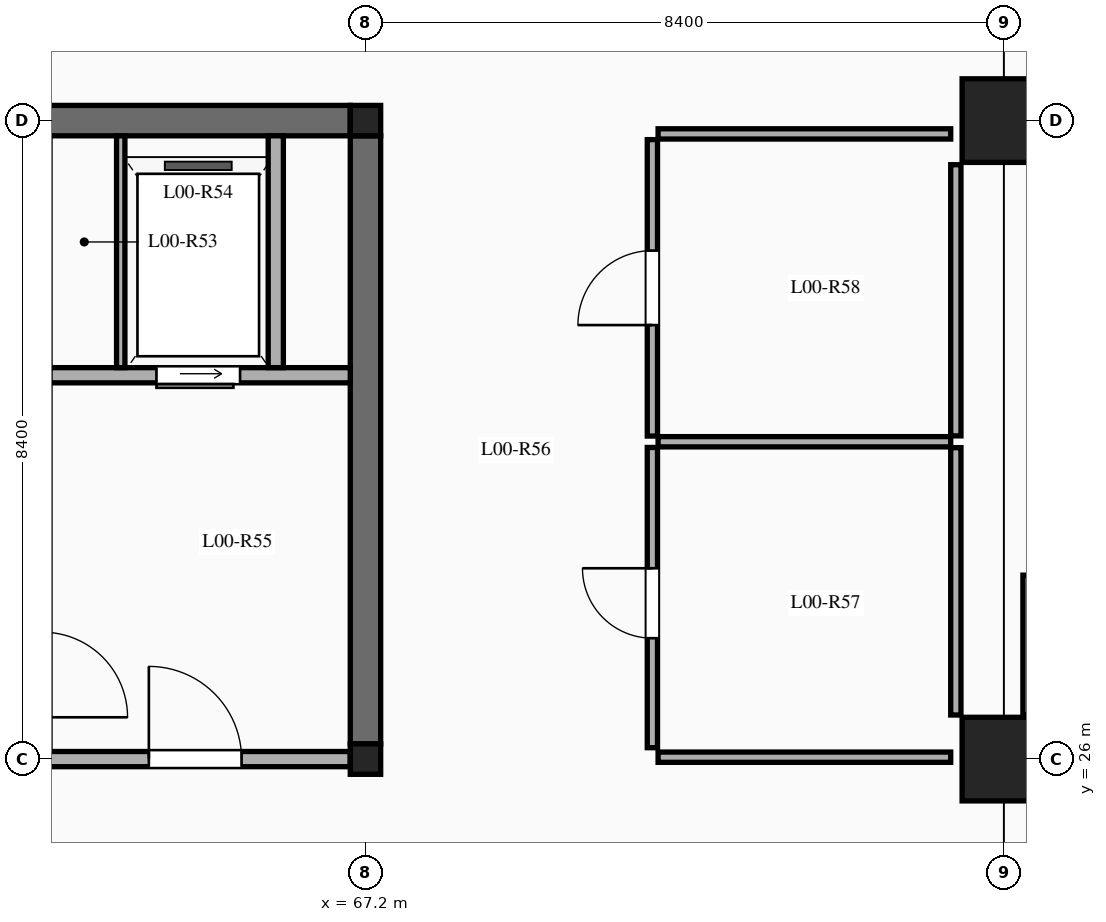
"""IFC4 building model, lengths in metres.
Left out: names, types, materials, properties, quantities, classifications, styles, units other than length and angle.
Written with IfcOpenShell. Run it as: python <this file> out.ifc"""

import sys

from ifc_helpers import new_model, si_unit, direction, frame, frame_2d, origin, origin_2d, place, context, subcontext, project, spatial, rectangle, extrude, element, fill, save


model = new_model("IFC4")
c1 = context("Model", 3, precision=1e-05, world=origin(), true_north=direction((0.0, 1.0)))
c2 = subcontext(c1, "Body", "Model", "MODEL_VIEW")
j1 = project(units=[si_unit("LENGTHUNIT", "METRE"), si_unit("PLANEANGLEUNIT", "RADIAN")], contexts=[c1])
p1 = place(None, origin())
s1 = spatial("IfcSite", under=j1, at=p1, CompositionType="ELEMENT")
p2 = place(p1, origin())
s2 = spatial("IfcBuilding", under=s1, at=p2, CompositionType="ELEMENT")
p3 = place(p2, origin())
s3 = spatial("IfcBuildingStorey", under=s2, at=p3, CompositionType="ELEMENT", Elevation=0.0)
for number, where, z_axis, x_axis in (
    (1, (67.2, 26.0, 0.0), (0.0, 0.0, 1.0), (1.0, 0.0, 0.0)),
    (2, (67.2, 34.4, 0.0), (0.0, 0.0, 1.0), (1.0, 0.0, 0.0)),
):
    element("IfcColumn", number, at=place(p3, frame(where, z_axis=z_axis, x_axis=x_axis)), inside=s3, PredefinedType="COLUMN", context=c2, shape_type="SweptSolid", body=[
        extrude(rectangle(XDim=0.4, YDim=0.4, at=origin_2d()), origin(), (0.0, 0.0, 1.0), 5.4),
    ])
for number, where, z_axis, x_axis in (
    (3, (75.6, 26.0, 0.0), (0.0, 0.0, 1.0), (1.0, 0.0, 0.0)),
    (4, (75.6, 34.4, 0.0), (0.0, 0.0, 1.0), (1.0, 0.0, 0.0)),
):
    element("IfcColumn", number, at=place(p3, frame(where, z_axis=z_axis, x_axis=x_axis)), inside=s3, PredefinedType="COLUMN", context=c2, shape_type="SweptSolid", body=[
        extrude(rectangle(XDim=1.1, YDim=1.1, at=origin_2d()), origin(), (0.0, 0.0, 1.0), 5.4),
    ])
for number, where, z_axis, x_axis in (
    (5, (67.2, 26.2, 0.0), (0.0, 0.0, 1.0), (0.0, 1.0, 0.0)),
    (6, (59.0, 34.4, 0.0), (0.0, 0.0, 1.0), (1.0, 0.0, 0.0)),
):
    element("IfcWall", number, at=place(p3, frame(where, z_axis=z_axis, x_axis=x_axis)), inside=s3, PredefinedType="SHEAR", context=c2, shape_type="SweptSolid", body=[
        extrude(rectangle(XDim=8.0, YDim=0.4, at=frame_2d((4.0, 0.0))), origin(), (0.0, 0.0, 1.0), 5.4),
    ])
p4 = place(p3, frame((59.0, 26.0, 0.0), z_axis=(0.0, 0.0, 1.0), x_axis=(1.0, 0.0, 0.0)))
e7 = element("IfcWall", 7, at=p4, inside=s3, PredefinedType="SOLIDWALL", context=c2, shape_type="SweptSolid", body=[
    extrude(rectangle(XDim=8.0, YDim=0.2, at=frame_2d((4.0, 0.0))), origin(), (0.0, 0.0, 1.0), 4.53),
])
p5 = place(p4, frame((1.55, 0.0, 0.0)))
e8 = element("IfcOpeningElement", 8, at=p5, cuts=e7, PredefinedType="OPENING", context=c2, shape_type="SweptSolid", body=[
    extrude(rectangle(XDim=1.15, YDim=2.15, at=frame_2d((0.575, 1.075))), frame((0.0, 0.11, 0.0), z_axis=(0.0, -1.0, 0.0), x_axis=(1.0, 0.0, 0.0)), (0.0, 0.0, 1.0), 0.22),
])
p6 = place(p4, frame((5.35, 0.0, 0.0)))
e9 = element("IfcOpeningElement", 9, at=p6, cuts=e7, PredefinedType="OPENING", context=c2, shape_type="SweptSolid", body=[
    extrude(rectangle(XDim=1.22, YDim=2.15, at=frame_2d((0.61, 1.075))), frame((0.0, 0.11, 0.0), z_axis=(0.0, -1.0, 0.0), x_axis=(1.0, 0.0, 0.0)), (0.0, 0.0, 1.0), 0.22),
])
p7 = place(p3, frame((63.05, 31.05, 0.0), z_axis=(0.0, 0.0, 1.0), x_axis=(1.0, 0.0, 0.0)))
e10 = element("IfcWall", 10, at=p7, inside=s3, PredefinedType="SOLIDWALL", context=c2, shape_type="SweptSolid", body=[
    extrude(rectangle(XDim=3.95, YDim=0.2, at=frame_2d((1.975, 0.0))), origin(), (0.0, 0.0, 1.0), 5.2),
])
p8 = place(p7, frame((1.4, 0.0, 0.0)))
e11 = element("IfcOpeningElement", 11, at=p8, cuts=e10, PredefinedType="OPENING", context=c2, shape_type="SweptSolid", body=[
    extrude(rectangle(XDim=1.1, YDim=2.15, at=frame_2d((0.55, 1.075))), frame((0.0, 0.11, 0.0), z_axis=(0.0, -1.0, 0.0), x_axis=(1.0, 0.0, 0.0)), (0.0, 0.0, 1.0), 0.22),
])
p9 = place(p3, frame((63.98, 31.15, 0.0), z_axis=(0.0, 0.0, 1.0), x_axis=(0.0, 1.0, 0.0)))
e12 = element("IfcWall", 12, at=p9, inside=s3, PredefinedType="PARTITIONING", context=c2, shape_type="SweptSolid", body=[
    extrude(rectangle(XDim=3.05, YDim=0.11, at=frame_2d((1.525, 0.0))), origin(), (0.0, 0.0, 1.0), 5.2),
])
p10 = place(p3, frame((66.02, 31.15, 0.0), z_axis=(0.0, 0.0, 1.0), x_axis=(0.0, 1.0, 0.0)))
e13 = element("IfcWall", 13, at=p10, inside=s3, PredefinedType="SOLIDWALL", context=c2, shape_type="SweptSolid", body=[
    extrude(rectangle(XDim=3.05, YDim=0.2, at=frame_2d((1.525, 0.0))), origin(), (0.0, 0.0, 1.0), 5.2),
])
p11 = place(p3, frame((75.95, 26.58, 0.0), z_axis=(0.0, 0.0, 1.0), x_axis=(0.0, 1.0, 0.0)))
e14 = element("IfcWall", 14, at=p11, inside=s3, PredefinedType="SOLIDWALL", context=c2, shape_type="SweptSolid", body=[
    extrude(rectangle(XDim=1.84, YDim=0.2, at=frame_2d((0.92, 0.0))), origin(), (0.0, 0.0, 1.0), 4.58),
])
p12 = place(p3, frame((70.975, 26.15, 0.0), z_axis=(0.0, 0.0, 1.0), x_axis=(0.0, 1.0, 0.0)))
e15 = element("IfcWall", 15, at=p12, inside=s3, PredefinedType="PARTITIONING", context=c2, shape_type="SweptSolid", body=[
    extrude(rectangle(XDim=3.95, YDim=0.135, at=frame_2d((1.975, 0.0))), origin(), (0.0, 0.0, 1.0), 4.35),
])
p13 = place(p12, frame((1.441, 0.0, 0.0)))
e16 = element("IfcOpeningElement", 16, at=p13, cuts=e15, PredefinedType="OPENING", context=c2, shape_type="SweptSolid", body=[
    extrude(rectangle(XDim=0.92, YDim=2.12, at=frame_2d((0.46, 1.06))), frame((0.0, 0.077, 0.0), z_axis=(0.0, -1.0, 0.0), x_axis=(1.0, 0.0, 0.0)), (0.0, 0.0, 1.0), 0.155),
])
p14 = place(p3, frame((70.975, 30.25, 0.0), z_axis=(0.0, 0.0, 1.0), x_axis=(0.0, 1.0, 0.0)))
e17 = element("IfcWall", 17, at=p14, inside=s3, PredefinedType="PARTITIONING", context=c2, shape_type="SweptSolid", body=[
    extrude(rectangle(XDim=3.9, YDim=0.135, at=frame_2d((1.95, 0.0))), origin(), (0.0, 0.0, 1.0), 4.35),
])
p15 = place(p14, frame((1.46, 0.0, 0.0)))
e18 = element("IfcOpeningElement", 18, at=p15, cuts=e17, PredefinedType="OPENING", context=c2, shape_type="SweptSolid", body=[
    extrude(rectangle(XDim=0.98, YDim=2.15, at=frame_2d((0.49, 1.075))), frame((0.0, 0.077, 0.0), z_axis=(0.0, -1.0, 0.0), x_axis=(1.0, 0.0, 0.0)), (0.0, 0.0, 1.0), 0.155),
])
for number, where, z_axis, x_axis in (
    (19, (71.05, 30.175, 0.0), (0.0, 0.0, 1.0), (1.0, 0.0, 0.0)),
    (20, (71.05, 26.025, 0.0), (0.0, 0.0, 1.0), (1.0, 0.0, 0.0)),
    (21, (71.05, 34.225, 0.0), (0.0, 0.0, 1.0), (1.0, 0.0, 0.0)),
):
    element("IfcWall", number, at=place(p3, frame(where, z_axis=z_axis, x_axis=x_axis)), inside=s3, PredefinedType="PARTITIONING", context=c2, shape_type="SweptSolid", body=[
        extrude(rectangle(XDim=3.85, YDim=0.135, at=frame_2d((1.925, 0.0))), origin(), (0.0, 0.0, 1.0), 4.35),
    ])
p16 = place(p3, frame((74.968, 26.58, 0.0), z_axis=(0.0, 0.0, 1.0), x_axis=(0.0, 1.0, 0.0)))
e22 = element("IfcWall", 22, at=p16, inside=s3, PredefinedType="PARTITIONING", context=c2, shape_type="SweptSolid", body=[
    extrude(rectangle(XDim=3.517, YDim=0.135, at=frame_2d((1.759, 0.0))), origin(), (0.0, 0.0, 1.0), 4.35),
])
p17 = place(p3, frame((74.968, 30.252, 0.0), z_axis=(0.0, 0.0, 1.0), x_axis=(0.0, 1.0, 0.0)))
e23 = element("IfcWall", 23, at=p17, inside=s3, PredefinedType="PARTITIONING", context=c2, shape_type="SweptSolid", body=[
    extrude(rectangle(XDim=3.568, YDim=0.135, at=frame_2d((1.784, 0.0))), origin(), (0.0, 0.0, 1.0), 4.35),
])
p18 = place(p6, origin())
e24 = element("IfcDoor", 24, at=p18, inside=s3, OperationType="SINGLE_SWING_LEFT", PredefinedType="DOOR", context=c2, shape_type="SweptSolid", body=[
    extrude(rectangle(XDim=1.22, YDim=2.15, at=frame_2d((0.61, 1.075))), frame((0.0, 0.025, 0.0), z_axis=(0.0, -1.0, 0.0), x_axis=(1.0, 0.0, 0.0)), (0.0, 0.0, 1.0), 0.05),
])
fill(e9, e24)
p19 = place(p8, frame((1.1, 0.0, 0.0), z_axis=(0.0, 0.0, 1.0), x_axis=(-1.0, 0.0, 0.0)))
e25 = element("IfcDoor", 25, at=p19, inside=s3, OperationType="SLIDING_TO_LEFT", PredefinedType="DOOR", context=c2, shape_type="SweptSolid", body=[
    extrude(rectangle(XDim=1.1, YDim=2.15, at=frame_2d((0.55, 1.075))), frame((0.0, 0.025, 0.0), z_axis=(0.0, -1.0, 0.0), x_axis=(1.0, 0.0, 0.0)), (0.0, 0.0, 1.0), 0.05),
])
fill(e11, e25)
p20 = place(p13, origin())
e26 = element("IfcDoor", 26, at=p20, inside=s3, OperationType="SINGLE_SWING_RIGHT", PredefinedType="DOOR", context=c2, shape_type="SweptSolid", body=[
    extrude(rectangle(XDim=0.92, YDim=2.12, at=frame_2d((0.46, 1.06))), frame((0.0, 0.025, 0.0), z_axis=(0.0, -1.0, 0.0), x_axis=(1.0, 0.0, 0.0)), (0.0, 0.0, 1.0), 0.05),
])
fill(e16, e26)
p21 = place(p15, origin())
e27 = element("IfcDoor", 27, at=p21, inside=s3, OperationType="SINGLE_SWING_LEFT", PredefinedType="DOOR", context=c2, shape_type="SweptSolid", body=[
    extrude(rectangle(XDim=0.98, YDim=2.15, at=frame_2d((0.49, 1.075))), frame((0.0, 0.025, 0.0), z_axis=(0.0, -1.0, 0.0), x_axis=(1.0, 0.0, 0.0)), (0.0, 0.0, 1.0), 0.05),
])
fill(e18, e27)
save(model, sys.argv[1])
